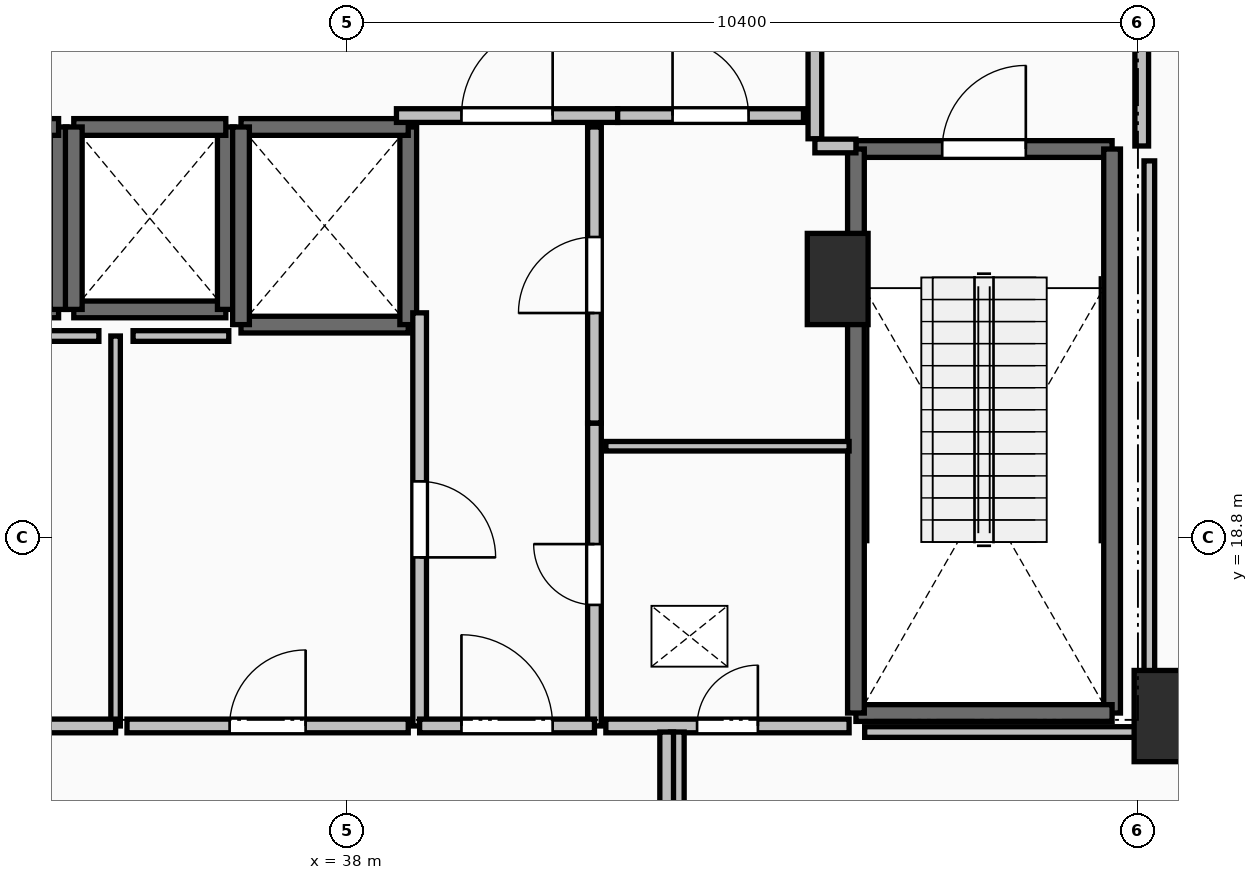
"""IFC4 building model, lengths in metres.
Left out: names, types, materials, properties, quantities, classifications, styles, units other than length and angle.
Written with IfcOpenShell. Run it as: python <this file> out.ifc"""

import sys

from ifc_helpers import new_model, si_unit, direction, frame, frame_2d, origin, origin_2d, place, context, subcontext, project, spatial, rectangle, extrude, element, fill, save


model = new_model("IFC4")
c1 = context("Model", 3, precision=1e-05, world=origin(), true_north=direction((0.0, 1.0)))
c2 = subcontext(c1, "Body", "Model", "MODEL_VIEW")
j1 = project(units=[si_unit("LENGTHUNIT", "METRE"), si_unit("PLANEANGLEUNIT", "RADIAN")], contexts=[c1])
p1 = place(None, origin())
s1 = spatial("IfcSite", under=j1, at=p1, CompositionType="ELEMENT")
p2 = place(p1, origin())
s2 = spatial("IfcBuilding", under=s1, at=p2, CompositionType="ELEMENT")
p3 = place(p2, frame((0.0, 0.0, 74.3)))
s3 = spatial("IfcBuildingStorey", under=s2, at=p3, CompositionType="ELEMENT", Elevation=74.3)
for number, where, z_axis, x_axis in (
    (1, (48.75, 16.45, 0.0), (0.0, 0.0, 1.0), (1.0, 0.0, 0.0)),
    (2, (44.45, 22.2, 0.0), (0.0, 0.0, 1.0), (1.0, 0.0, 0.0)),
):
    element("IfcColumn", number, at=place(p3, frame(where, z_axis=z_axis, x_axis=x_axis)), inside=s3, PredefinedType="PILASTER", context=c2, shape_type="SweptSolid", body=[
        extrude(rectangle(XDim=0.8, YDim=1.2, at=origin_2d()), origin(), (0.0, 0.0, 1.0), 4.5),
    ])
p4 = place(p3, frame((44.69, 23.91, 0.0), z_axis=(0.0, 0.0, 1.0), x_axis=(1.0, 0.0, 0.0)))
e3 = element("IfcWall", 3, at=p4, inside=s3, PredefinedType="SOLIDWALL", context=c2, shape_type="SweptSolid", body=[
    extrude(rectangle(XDim=3.37, YDim=0.22, at=frame_2d((1.685, 0.0))), origin(), (0.0, 0.0, 1.0), 4.24),
])
p5 = place(p4, frame((1.135, 0.0, 0.0)))
e4 = element("IfcOpeningElement", 4, at=p5, cuts=e3, PredefinedType="OPENING", context=c2, shape_type="SweptSolid", body=[
    extrude(rectangle(XDim=1.1, YDim=2.15, at=frame_2d((0.55, 1.075))), frame((0.0, 0.125, 0.0), z_axis=(0.0, -1.0, 0.0), x_axis=(1.0, 0.0, 0.0)), (0.0, 0.0, 1.0), 0.25),
])
p6 = place(p3, frame((48.06, 23.91, 0.0), z_axis=(0.0, 0.0, 1.0), x_axis=(0.0, -1.0, 0.0)))
e5 = element("IfcWall", 5, at=p6, inside=s3, PredefinedType="SOLIDWALL", context=c2, shape_type="SweptSolid", body=[
    extrude(rectangle(XDim=7.42, YDim=0.22, at=frame_2d((3.71, 0.0))), origin(), (0.0, 0.0, 1.0), 4.24),
])
p7 = place(p3, frame((48.06, 16.49, 0.0), z_axis=(0.0, 0.0, 1.0), x_axis=(-1.0, 0.0, 0.0)))
e6 = element("IfcWall", 6, at=p7, inside=s3, PredefinedType="SOLIDWALL", context=c2, shape_type="SweptSolid", body=[
    extrude(rectangle(XDim=3.37, YDim=0.22, at=frame_2d((1.685, 0.0))), origin(), (0.0, 0.0, 1.0), 4.24),
])
p8 = place(p3, frame((44.69, 16.49, 0.0), z_axis=(0.0, 0.0, 1.0), x_axis=(0.0, 1.0, 0.0)))
e7 = element("IfcWall", 7, at=p8, inside=s3, PredefinedType="SOLIDWALL", context=c2, shape_type="SweptSolid", body=[
    extrude(rectangle(XDim=7.42, YDim=0.22, at=frame_2d((3.71, 0.0))), origin(), (0.0, 0.0, 1.0), 4.24),
])
p9 = place(p3, frame((32.2, 21.8, 0.0), z_axis=(0.0, 0.0, 1.0), x_axis=(1.0, 0.0, 0.0)))
e8 = element("IfcWall", 8, at=p9, inside=s3, PredefinedType="SOLIDWALL", context=c2, shape_type="SweptSolid", body=[
    extrude(rectangle(XDim=2.0, YDim=0.22, at=frame_2d((1.0, 0.0))), origin(), (0.0, 0.0, 1.0), 4.24),
])
p10 = place(p3, frame((34.2, 21.8, 0.0), z_axis=(0.0, 0.0, 1.0), x_axis=(0.0, 1.0, 0.0)))
e9 = element("IfcWall", 9, at=p10, inside=s3, PredefinedType="SOLIDWALL", context=c2, shape_type="SweptSolid", body=[
    extrude(rectangle(XDim=2.4, YDim=0.22, at=frame_2d((1.2, 0.0))), origin(), (0.0, 0.0, 1.0), 4.24),
])
for number, where, z_axis, x_axis in (
    (10, (34.2, 24.2, 0.0), (0.0, 0.0, 1.0), (-1.0, 0.0, 0.0)),
    (11, (34.4, 21.8, 0.0), (0.0, 0.0, 1.0), (1.0, 0.0, 0.0)),
):
    element("IfcWall", number, at=place(p3, frame(where, z_axis=z_axis, x_axis=x_axis)), inside=s3, PredefinedType="SOLIDWALL", context=c2, shape_type="SweptSolid", body=[
        extrude(rectangle(XDim=2.0, YDim=0.22, at=frame_2d((1.0, 0.0))), origin(), (0.0, 0.0, 1.0), 4.24),
    ])
p11 = place(p3, frame((36.4, 21.8, 0.0), z_axis=(0.0, 0.0, 1.0), x_axis=(0.0, 1.0, 0.0)))
e12 = element("IfcWall", 12, at=p11, inside=s3, PredefinedType="SOLIDWALL", context=c2, shape_type="SweptSolid", body=[
    extrude(rectangle(XDim=2.4, YDim=0.22, at=frame_2d((1.2, 0.0))), origin(), (0.0, 0.0, 1.0), 4.24),
])
p12 = place(p3, frame((36.4, 24.2, 0.0), z_axis=(0.0, 0.0, 1.0), x_axis=(-1.0, 0.0, 0.0)))
e13 = element("IfcWall", 13, at=p12, inside=s3, PredefinedType="SOLIDWALL", context=c2, shape_type="SweptSolid", body=[
    extrude(rectangle(XDim=2.0, YDim=0.22, at=frame_2d((1.0, 0.0))), origin(), (0.0, 0.0, 1.0), 4.24),
])
p13 = place(p3, frame((34.4, 24.2, 0.0), z_axis=(0.0, 0.0, 1.0), x_axis=(0.0, -1.0, 0.0)))
e14 = element("IfcWall", 14, at=p13, inside=s3, PredefinedType="SOLIDWALL", context=c2, shape_type="SweptSolid", body=[
    extrude(rectangle(XDim=2.4, YDim=0.22, at=frame_2d((1.2, 0.0))), origin(), (0.0, 0.0, 1.0), 4.24),
])
p14 = place(p3, frame((36.6, 21.6, 0.0), z_axis=(0.0, 0.0, 1.0), x_axis=(1.0, 0.0, 0.0)))
e15 = element("IfcWall", 15, at=p14, inside=s3, PredefinedType="SOLIDWALL", context=c2, shape_type="SweptSolid", body=[
    extrude(rectangle(XDim=2.2, YDim=0.22, at=frame_2d((1.1, 0.0))), origin(), (0.0, 0.0, 1.0), 4.24),
])
p15 = place(p3, frame((38.8, 21.6, 0.0), z_axis=(0.0, 0.0, 1.0), x_axis=(0.0, 1.0, 0.0)))
e16 = element("IfcWall", 16, at=p15, inside=s3, PredefinedType="SOLIDWALL", context=c2, shape_type="SweptSolid", body=[
    extrude(rectangle(XDim=2.6, YDim=0.22, at=frame_2d((1.3, 0.0))), origin(), (0.0, 0.0, 1.0), 4.24),
])
p16 = place(p3, frame((38.8, 24.2, 0.0), z_axis=(0.0, 0.0, 1.0), x_axis=(-1.0, 0.0, 0.0)))
e17 = element("IfcWall", 17, at=p16, inside=s3, PredefinedType="SOLIDWALL", context=c2, shape_type="SweptSolid", body=[
    extrude(rectangle(XDim=2.2, YDim=0.22, at=frame_2d((1.1, 0.0))), origin(), (0.0, 0.0, 1.0), 4.24),
])
p17 = place(p3, frame((36.6, 24.2, 0.0), z_axis=(0.0, 0.0, 1.0), x_axis=(0.0, -1.0, 0.0)))
e18 = element("IfcWall", 18, at=p17, inside=s3, PredefinedType="SOLIDWALL", context=c2, shape_type="SweptSolid", body=[
    extrude(rectangle(XDim=2.6, YDim=0.22, at=frame_2d((1.3, 0.0))), origin(), (0.0, 0.0, 1.0), 4.24),
])
p18 = place(p3, frame((44.15, 27.955, 0.0), z_axis=(0.0, 0.0, 1.0), x_axis=(0.0, -1.0, 0.0)))
e19 = element("IfcWall", 19, at=p18, inside=s3, PredefinedType="PARTITIONING", context=c2, shape_type="SweptSolid", body=[
    extrude(rectangle(XDim=3.91, YDim=0.18, at=frame_2d((1.955, 0.0))), origin(), (0.0, 0.0, 1.0), 4.24),
])
p19 = place(p18, frame((1.355, 0.0, 0.0)))
e20 = element("IfcOpeningElement", 20, at=p19, cuts=e19, PredefinedType="OPENING", context=c2, shape_type="SweptSolid", body=[
    extrude(rectangle(XDim=1.2, YDim=2.15, at=frame_2d((0.6, 1.075))), frame((0.0, 0.105, 0.0), z_axis=(0.0, -1.0, 0.0), x_axis=(1.0, 0.0, 0.0)), (0.0, 0.0, 1.0), 0.21),
])
p20 = place(p3, frame((44.15, 23.95, 0.0), z_axis=(0.0, 0.0, 1.0), x_axis=(1.0, 0.0, 0.0)))
e21 = element("IfcWall", 21, at=p20, inside=s3, PredefinedType="PARTITIONING", context=c2, shape_type="SweptSolid", body=[
    extrude(rectangle(XDim=0.54, YDim=0.18, at=frame_2d((0.27, 0.0))), origin(), (0.0, 0.0, 1.0), 4.24),
])
p21 = place(p3, frame((48.45, 23.95, 0.0), z_axis=(0.0, 0.0, 1.0), x_axis=(0.0, 1.0, 0.0)))
e22 = element("IfcWall", 22, at=p21, inside=s3, PredefinedType="PARTITIONING", context=c2, shape_type="SweptSolid", body=[
    extrude(rectangle(XDim=4.05, YDim=0.18, at=frame_2d((2.025, 0.0))), origin(), (0.0, 0.0, 1.0), 4.24),
])
p22 = place(p21, frame((1.425, 0.0, 0.0)))
e23 = element("IfcOpeningElement", 23, at=p22, cuts=e22, PredefinedType="OPENING", context=c2, shape_type="SweptSolid", body=[
    extrude(rectangle(XDim=1.2, YDim=2.15, at=frame_2d((0.6, 1.075))), frame((0.0, 0.105, 0.0), z_axis=(0.0, -1.0, 0.0), x_axis=(1.0, 0.0, 0.0)), (0.0, 0.0, 1.0), 0.21),
])
p23 = place(p3, frame((38.645, 24.35, 0.0), z_axis=(0.0, 0.0, 1.0), x_axis=(1.0, 0.0, 0.0)))
e24 = element("IfcWall", 24, at=p23, inside=s3, PredefinedType="PARTITIONING", context=c2, shape_type="SweptSolid", body=[
    extrude(rectangle(XDim=2.91, YDim=0.18, at=frame_2d((1.455, 0.0))), origin(), (0.0, 0.0, 1.0), 4.24),
])
p24 = place(p23, frame((0.855, 0.0, 0.0)))
e25 = element("IfcOpeningElement", 25, at=p24, cuts=e24, PredefinedType="OPENING", context=c2, shape_type="SweptSolid", body=[
    extrude(rectangle(XDim=1.2, YDim=2.15, at=frame_2d((0.6, 1.075))), frame((0.0, 0.105, 0.0), z_axis=(0.0, -1.0, 0.0), x_axis=(1.0, 0.0, 0.0)), (0.0, 0.0, 1.0), 0.21),
])
p25 = place(p3, frame((41.555, 24.35, 0.0), z_axis=(0.0, 0.0, 1.0), x_axis=(1.0, 0.0, 0.0)))
e26 = element("IfcWall", 26, at=p25, inside=s3, PredefinedType="PARTITIONING", context=c2, shape_type="SweptSolid", body=[
    extrude(rectangle(XDim=2.445, YDim=0.18, at=frame_2d((1.223, 0.0))), origin(), (0.0, 0.0, 1.0), 4.24),
])
p26 = place(p25, frame((0.722, 0.0, 0.0)))
e27 = element("IfcOpeningElement", 27, at=p26, cuts=e26, PredefinedType="OPENING", context=c2, shape_type="SweptSolid", body=[
    extrude(rectangle(XDim=1.0, YDim=2.15, at=frame_2d((0.5, 1.075))), frame((0.0, 0.105, 0.0), z_axis=(0.0, -1.0, 0.0), x_axis=(1.0, 0.0, 0.0)), (0.0, 0.0, 1.0), 0.21),
])
p27 = place(p3, frame((41.25, 16.32, 0.0), z_axis=(0.0, 0.0, 1.0), x_axis=(0.0, 1.0, 0.0)))
e28 = element("IfcWall", 28, at=p27, inside=s3, PredefinedType="PARTITIONING", context=c2, shape_type="SweptSolid", body=[
    extrude(rectangle(XDim=3.985, YDim=0.18, at=frame_2d((1.992, 0.0))), origin(), (0.0, 0.0, 1.0), 4.24),
])
p28 = place(p27, frame((1.593, 0.0, 0.0)))
e29 = element("IfcOpeningElement", 29, at=p28, cuts=e28, PredefinedType="OPENING", context=c2, shape_type="SweptSolid", body=[
    extrude(rectangle(XDim=0.8, YDim=2.05, at=frame_2d((0.4, 1.025))), frame((0.0, 0.105, 0.0), z_axis=(0.0, -1.0, 0.0), x_axis=(1.0, 0.0, 0.0)), (0.0, 0.0, 1.0), 0.21),
])
p29 = place(p3, frame((41.25, 20.305, 0.0), z_axis=(0.0, 0.0, 1.0), x_axis=(0.0, 1.0, 0.0)))
e30 = element("IfcWall", 30, at=p29, inside=s3, PredefinedType="PARTITIONING", context=c2, shape_type="SweptSolid", body=[
    extrude(rectangle(XDim=3.895, YDim=0.18, at=frame_2d((1.948, 0.0))), origin(), (0.0, 0.0, 1.0), 4.24),
])
p30 = place(p29, frame((1.448, 0.0, 0.0)))
e31 = element("IfcOpeningElement", 31, at=p30, cuts=e30, PredefinedType="OPENING", context=c2, shape_type="SweptSolid", body=[
    extrude(rectangle(XDim=1.0, YDim=2.15, at=frame_2d((0.5, 1.075))), frame((0.0, 0.105, 0.0), z_axis=(0.0, -1.0, 0.0), x_axis=(1.0, 0.0, 0.0)), (0.0, 0.0, 1.0), 0.21),
])
p31 = place(p3, frame((38.95, 21.755, 0.0), z_axis=(0.0, 0.0, 1.0), x_axis=(0.0, -1.0, 0.0)))
e32 = element("IfcWall", 32, at=p31, inside=s3, PredefinedType="PARTITIONING", context=c2, shape_type="SweptSolid", body=[
    extrude(rectangle(XDim=5.435, YDim=0.18, at=frame_2d((2.717, 0.0))), origin(), (0.0, 0.0, 1.0), 4.24),
])
p32 = place(p31, frame((2.218, 0.0, 0.0)))
e33 = element("IfcOpeningElement", 33, at=p32, cuts=e32, PredefinedType="OPENING", context=c2, shape_type="SweptSolid", body=[
    extrude(rectangle(XDim=1.0, YDim=2.15, at=frame_2d((0.5, 1.075))), frame((0.0, 0.105, 0.0), z_axis=(0.0, -1.0, 0.0), x_axis=(1.0, 0.0, 0.0)), (0.0, 0.0, 1.0), 0.21),
])
p33 = place(p3, frame((38.95, 16.32, 0.0), z_axis=(0.0, 0.0, 1.0), x_axis=(1.0, 0.0, 0.0)))
e34 = element("IfcWall", 34, at=p33, inside=s3, PredefinedType="PARTITIONING", context=c2, shape_type="SweptSolid", body=[
    extrude(rectangle(XDim=2.3, YDim=0.18, at=frame_2d((1.15, 0.0))), origin(), (0.0, 0.0, 1.0), 4.24),
])
p34 = place(p33, frame((0.55, 0.0, 0.0)))
e35 = element("IfcOpeningElement", 35, at=p34, cuts=e34, PredefinedType="OPENING", context=c2, shape_type="SweptSolid", body=[
    extrude(rectangle(XDim=1.2, YDim=2.15, at=frame_2d((0.6, 1.075))), frame((0.0, 0.105, 0.0), z_axis=(0.0, -1.0, 0.0), x_axis=(1.0, 0.0, 0.0)), (0.0, 0.0, 1.0), 0.21),
])
p35 = place(p3, frame((44.6, 20.0, 0.0), z_axis=(0.0, 0.0, 1.0), x_axis=(-1.0, 0.0, 0.0)))
e36 = element("IfcWall", 36, at=p35, inside=s3, PredefinedType="PARTITIONING", context=c2, shape_type="SweptSolid", body=[
    extrude(rectangle(XDim=3.2, YDim=0.125, at=frame_2d((1.6, 0.0))), origin(), (0.0, 0.0, 1.0), 4.24),
])
p36 = place(p3, frame((41.4, 16.32, 0.0), z_axis=(0.0, 0.0, 1.0), x_axis=(1.0, 0.0, 0.0)))
e37 = element("IfcWall", 37, at=p36, inside=s3, PredefinedType="PARTITIONING", context=c2, shape_type="SweptSolid", body=[
    extrude(rectangle(XDim=3.2, YDim=0.18, at=frame_2d((1.6, 0.0))), origin(), (0.0, 0.0, 1.0), 4.24),
])
p37 = place(p36, frame((1.2, 0.0, 0.0)))
e38 = element("IfcOpeningElement", 38, at=p37, cuts=e37, PredefinedType="OPENING", context=c2, shape_type="SweptSolid", body=[
    extrude(rectangle(XDim=0.8, YDim=2.05, at=frame_2d((0.4, 1.025))), frame((0.0, 0.105, 0.0), z_axis=(0.0, -1.0, 0.0), x_axis=(1.0, 0.0, 0.0)), (0.0, 0.0, 1.0), 0.21),
])
p38 = place(p3, frame((34.95, 16.32, 0.0), z_axis=(0.0, 0.0, 1.0), x_axis=(0.0, 1.0, 0.0)))
e39 = element("IfcWall", 39, at=p38, inside=s3, PredefinedType="PARTITIONING", context=c2, shape_type="SweptSolid", body=[
    extrude(rectangle(XDim=5.13, YDim=0.125, at=frame_2d((2.565, 0.0))), origin(), (0.0, 0.0, 1.0), 4.24),
])
p39 = place(p3, frame((31.4, 16.32, 0.0), z_axis=(0.0, 0.0, 1.0), x_axis=(1.0, 0.0, 0.0)))
e40 = element("IfcWall", 40, at=p39, inside=s3, PredefinedType="PARTITIONING", context=c2, shape_type="SweptSolid", body=[
    extrude(rectangle(XDim=3.55, YDim=0.18, at=frame_2d((1.775, 0.0))), origin(), (0.0, 0.0, 1.0), 4.24),
])
p40 = place(p39, frame((1.35, 0.0, 0.0)))
e41 = element("IfcOpeningElement", 41, at=p40, cuts=e40, PredefinedType="OPENING", context=c2, shape_type="SweptSolid", body=[
    extrude(rectangle(XDim=0.85, YDim=2.1, at=frame_2d((0.425, 1.05))), frame((0.0, 0.105, 0.0), z_axis=(0.0, -1.0, 0.0), x_axis=(1.0, 0.0, 0.0)), (0.0, 0.0, 1.0), 0.21),
])
p41 = place(p3, frame((35.1, 16.32, 0.0), z_axis=(0.0, 0.0, 1.0), x_axis=(1.0, 0.0, 0.0)))
e42 = element("IfcWall", 42, at=p41, inside=s3, PredefinedType="PARTITIONING", context=c2, shape_type="SweptSolid", body=[
    extrude(rectangle(XDim=3.7, YDim=0.18, at=frame_2d((1.85, 0.0))), origin(), (0.0, 0.0, 1.0), 4.24),
])
p42 = place(p41, frame((1.35, 0.0, 0.0)))
e43 = element("IfcOpeningElement", 43, at=p42, cuts=e42, PredefinedType="OPENING", context=c2, shape_type="SweptSolid", body=[
    extrude(rectangle(XDim=1.0, YDim=2.15, at=frame_2d((0.5, 1.075))), frame((0.0, 0.105, 0.0), z_axis=(0.0, -1.0, 0.0), x_axis=(1.0, 0.0, 0.0)), (0.0, 0.0, 1.0), 0.21),
])
for number, where, z_axis, x_axis in (
    (44, (42.34, 16.24, 0.0), (0.0, 0.0, 1.0), (0.0, -1.0, 0.0)),
    (45, (42.2, 14.1, 0.0), (0.0, 0.0, 1.0), (0.0, 1.0, 0.0)),
):
    element("IfcWall", number, at=place(p3, frame(where, z_axis=z_axis, x_axis=x_axis)), inside=s3, PredefinedType="PARTITIONING", context=c2, shape_type="SweptSolid", body=[
        extrude(rectangle(XDim=2.14, YDim=0.18, at=frame_2d((1.07, 0.0))), origin(), (0.0, 0.0, 1.0), 3.922),
    ])
p43 = place(p3, frame((34.73, 21.45, 0.0), z_axis=(0.0, 0.0, 1.0), x_axis=(-1.0, 0.0, 0.0)))
e46 = element("IfcWall", 46, at=p43, inside=s3, PredefinedType="PARTITIONING", context=c2, shape_type="SweptSolid", body=[
    extrude(rectangle(XDim=3.2, YDim=0.14, at=frame_2d((1.6, 0.0))), origin(), (0.0, 0.0, 1.0), 4.24),
])
p44 = place(p3, frame((36.439, 21.45, 0.0), z_axis=(0.0, 0.0, 1.0), x_axis=(-1.0, 0.0, 0.0)))
e47 = element("IfcWall", 47, at=p44, inside=s3, PredefinedType="PARTITIONING", context=c2, shape_type="SweptSolid", body=[
    extrude(rectangle(XDim=1.259, YDim=0.14, at=frame_2d((0.629, 0.0))), origin(), (0.0, 0.0, 1.0), 4.24),
])
p45 = place(p3, frame((48.55, 23.754, 0.0), z_axis=(0.0, 0.0, 1.0), x_axis=(0.0, -1.0, 0.0)))
e48 = element("IfcWall", 48, at=p45, inside=s3, PredefinedType="PARTITIONING", context=c2, shape_type="SweptSolid", body=[
    extrude(rectangle(XDim=7.514, YDim=0.14, at=frame_2d((3.757, 0.0))), origin(), (0.0, 0.0, 1.0), 3.432),
])
p46 = place(p3, frame((48.55, 16.24, 0.0), z_axis=(0.0, 0.0, 1.0), x_axis=(-1.0, 0.0, 0.0)))
e49 = element("IfcWall", 49, at=p46, inside=s3, PredefinedType="PARTITIONING", context=c2, shape_type="SweptSolid", body=[
    extrude(rectangle(XDim=3.745, YDim=0.14, at=frame_2d((1.873, 0.0))), origin(), (0.0, 0.0, 1.0), 3.432),
])
p47 = place(p5, origin())
e50 = element("IfcDoor", 50, at=p47, inside=s3, OperationType="SINGLE_SWING_RIGHT", PredefinedType="DOOR", context=c2, shape_type="SweptSolid", body=[
    extrude(rectangle(XDim=1.1, YDim=2.15, at=frame_2d((0.55, 1.075))), frame((0.0, 0.025, 0.0), z_axis=(0.0, -1.0, 0.0), x_axis=(1.0, 0.0, 0.0)), (0.0, 0.0, 1.0), 0.05),
])
fill(e4, e50)
p48 = place(p24, origin())
e51 = element("IfcDoor", 51, at=p48, inside=s3, OperationType="SINGLE_SWING_RIGHT", PredefinedType="DOOR", context=c2, shape_type="SweptSolid", body=[
    extrude(rectangle(XDim=1.2, YDim=2.15, at=frame_2d((0.6, 1.075))), frame((0.0, 0.025, 0.0), z_axis=(0.0, -1.0, 0.0), x_axis=(1.0, 0.0, 0.0)), (0.0, 0.0, 1.0), 0.05),
])
fill(e25, e51)
p49 = place(p26, origin())
e52 = element("IfcDoor", 52, at=p49, inside=s3, OperationType="SINGLE_SWING_LEFT", PredefinedType="DOOR", context=c2, shape_type="SweptSolid", body=[
    extrude(rectangle(XDim=1.0, YDim=2.15, at=frame_2d((0.5, 1.075))), frame((0.0, 0.025, 0.0), z_axis=(0.0, -1.0, 0.0), x_axis=(1.0, 0.0, 0.0)), (0.0, 0.0, 1.0), 0.05),
])
fill(e27, e52)
p50 = place(p28, origin())
e53 = element("IfcDoor", 53, at=p50, inside=s3, OperationType="SINGLE_SWING_RIGHT", PredefinedType="DOOR", context=c2, shape_type="SweptSolid", body=[
    extrude(rectangle(XDim=0.8, YDim=2.05, at=frame_2d((0.4, 1.025))), frame((0.0, 0.025, 0.0), z_axis=(0.0, -1.0, 0.0), x_axis=(1.0, 0.0, 0.0)), (0.0, 0.0, 1.0), 0.05),
])
fill(e29, e53)
p51 = place(p30, origin())
e54 = element("IfcDoor", 54, at=p51, inside=s3, OperationType="SINGLE_SWING_LEFT", PredefinedType="DOOR", context=c2, shape_type="SweptSolid", body=[
    extrude(rectangle(XDim=1.0, YDim=2.15, at=frame_2d((0.5, 1.075))), frame((0.0, 0.025, 0.0), z_axis=(0.0, -1.0, 0.0), x_axis=(1.0, 0.0, 0.0)), (0.0, 0.0, 1.0), 0.05),
])
fill(e31, e54)
p52 = place(p32, origin())
e55 = element("IfcDoor", 55, at=p52, inside=s3, OperationType="SINGLE_SWING_RIGHT", PredefinedType="DOOR", context=c2, shape_type="SweptSolid", body=[
    extrude(rectangle(XDim=1.0, YDim=2.15, at=frame_2d((0.5, 1.075))), frame((0.0, 0.025, 0.0), z_axis=(0.0, -1.0, 0.0), x_axis=(1.0, 0.0, 0.0)), (0.0, 0.0, 1.0), 0.05),
])
fill(e33, e55)
p53 = place(p34, origin())
e56 = element("IfcDoor", 56, at=p53, inside=s3, OperationType="SINGLE_SWING_LEFT", PredefinedType="DOOR", context=c2, shape_type="SweptSolid", body=[
    extrude(rectangle(XDim=1.2, YDim=2.15, at=frame_2d((0.6, 1.075))), frame((0.0, 0.025, 0.0), z_axis=(0.0, -1.0, 0.0), x_axis=(1.0, 0.0, 0.0)), (0.0, 0.0, 1.0), 0.05),
])
fill(e35, e56)
p54 = place(p37, origin())
e57 = element("IfcDoor", 57, at=p54, inside=s3, OperationType="SINGLE_SWING_RIGHT", PredefinedType="DOOR", context=c2, shape_type="SweptSolid", body=[
    extrude(rectangle(XDim=0.8, YDim=2.05, at=frame_2d((0.4, 1.025))), frame((0.0, 0.025, 0.0), z_axis=(0.0, -1.0, 0.0), x_axis=(1.0, 0.0, 0.0)), (0.0, 0.0, 1.0), 0.05),
])
fill(e38, e57)
p55 = place(p42, origin())
e58 = element("IfcDoor", 58, at=p55, inside=s3, OperationType="SINGLE_SWING_RIGHT", PredefinedType="DOOR", context=c2, shape_type="SweptSolid", body=[
    extrude(rectangle(XDim=1.0, YDim=2.15, at=frame_2d((0.5, 1.075))), frame((0.0, 0.025, 0.0), z_axis=(0.0, -1.0, 0.0), x_axis=(1.0, 0.0, 0.0)), (0.0, 0.0, 1.0), 0.05),
])
fill(e43, e58)
save(model, sys.argv[1])
